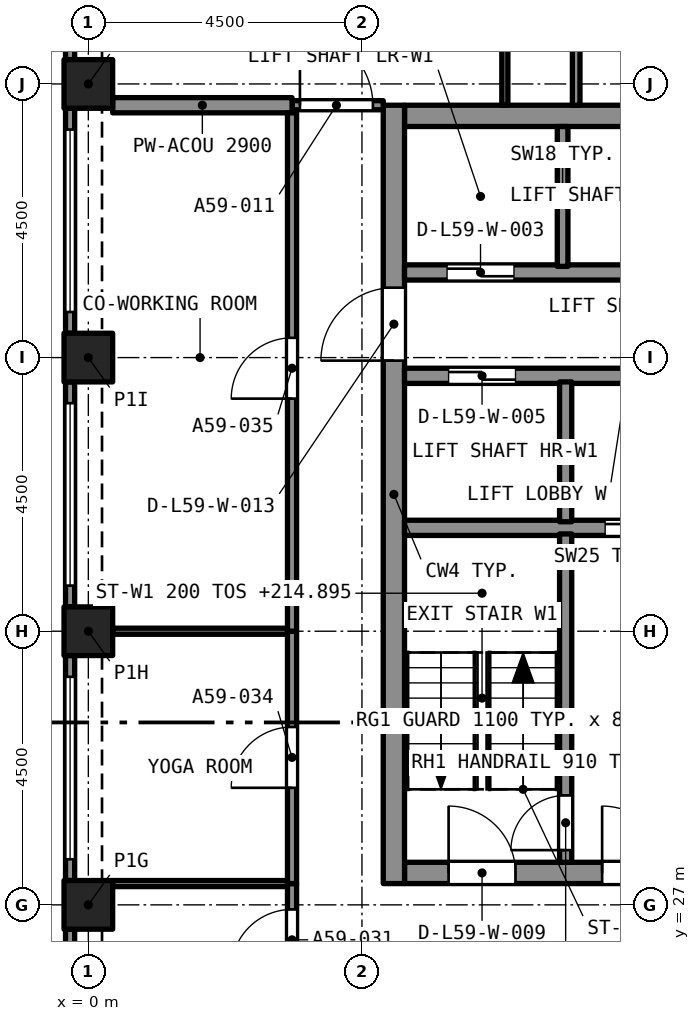
"""IFC4 building model, lengths in metres.
Left out: names, types, materials, properties, quantities, classifications, styles, units other than length and angle.
Written with IfcOpenShell. Run it as: python <this file> out.ifc"""

import sys

from ifc_helpers import new_model, si_unit, direction, frame, frame_2d, origin, origin_2d, place, context, subcontext, project, spatial, rectangle, extrude, element, fill, save


model = new_model("IFC4")
c1 = context("Model", 3, precision=1e-05, world=origin(), true_north=direction((0.0, 1.0)))
c2 = subcontext(c1, "Body", "Model", "MODEL_VIEW")
j1 = project(units=[si_unit("LENGTHUNIT", "METRE"), si_unit("PLANEANGLEUNIT", "RADIAN")], contexts=[c1])
p1 = place(None, origin())
s1 = spatial("IfcSite", under=j1, at=p1, CompositionType="ELEMENT")
p2 = place(p1, origin())
s2 = spatial("IfcBuilding", under=s1, at=p2, CompositionType="ELEMENT")
p3 = place(p2, frame((0.0, 0.0, 213.295)))
s3 = spatial("IfcBuildingStorey", under=s2, at=p3, CompositionType="ELEMENT", Elevation=213.295)
for number, where, z_axis, x_axis in (
    (1, (0.0, 27.0, 0.0), (0.0, 0.0, 1.0), (1.0, 0.0, 0.0)),
    (2, (0.0, 31.5, 0.0), (0.0, 0.0, 1.0), (1.0, 0.0, 0.0)),
    (3, (0.0, 36.0, 0.0), (0.0, 0.0, 1.0), (1.0, 0.0, 0.0)),
    (4, (0.0, 40.5, 0.0), (0.0, 0.0, 1.0), (1.0, 0.0, 0.0)),
):
    element("IfcColumn", number, at=place(p3, frame(where, z_axis=z_axis, x_axis=x_axis)), inside=s3, PredefinedType="COLUMN", context=c2, shape_type="SweptSolid", body=[
        extrude(rectangle(XDim=0.8, YDim=0.8, at=origin_2d()), origin(), (0.0, 0.0, 1.0), 3.2),
    ])
p4 = place(p3, frame((5.2, 27.525, 0.0), z_axis=(0.0, 0.0, 1.0), x_axis=(1.0, 0.0, 0.0)))
e5 = element("IfcWall", 5, at=p4, inside=s3, PredefinedType="SOLIDWALL", context=c2, shape_type="SweptSolid", body=[
    extrude(rectangle(XDim=7.6, YDim=0.35, at=frame_2d((3.8, 0.0))), origin(), (0.0, 0.0, 1.0), 3.2),
])
p5 = place(p4, frame((0.725, 0.0, 0.0)))
e6 = element("IfcOpeningElement", 6, at=p5, cuts=e5, PredefinedType="OPENING", context=c2, shape_type="SweptSolid", body=[
    extrude(rectangle(XDim=1.1, YDim=2.1, at=frame_2d((0.55, 1.05))), frame((0.0, 0.185, 0.0), z_axis=(0.0, -1.0, 0.0), x_axis=(1.0, 0.0, 0.0)), (0.0, 0.0, 1.0), 0.37),
])
p6 = place(p4, frame((3.25, 0.0, 0.0)))
e7 = element("IfcOpeningElement", 7, at=p6, cuts=e5, PredefinedType="OPENING", context=c2, shape_type="SweptSolid", body=[
    extrude(rectangle(XDim=1.1, YDim=2.1, at=frame_2d((0.55, 1.05))), frame((0.0, 0.185, 0.0), z_axis=(0.0, -1.0, 0.0), x_axis=(1.0, 0.0, 0.0)), (0.0, 0.0, 1.0), 0.37),
])
p7 = place(p4, frame((5.775, 0.0, 0.0)))
e8 = element("IfcOpeningElement", 8, at=p7, cuts=e5, PredefinedType="OPENING", context=c2, shape_type="SweptSolid", body=[
    extrude(rectangle(XDim=1.1, YDim=2.1, at=frame_2d((0.55, 1.05))), frame((0.0, 0.185, 0.0), z_axis=(0.0, -1.0, 0.0), x_axis=(1.0, 0.0, 0.0)), (0.0, 0.0, 1.0), 0.37),
])
p8 = place(p3, frame((5.2, 39.975, 0.0), z_axis=(0.0, 0.0, 1.0), x_axis=(1.0, 0.0, 0.0)))
e9 = element("IfcWall", 9, at=p8, inside=s3, PredefinedType="SOLIDWALL", context=c2, shape_type="SweptSolid", body=[
    extrude(rectangle(XDim=7.6, YDim=0.35, at=frame_2d((3.8, 0.0))), origin(), (0.0, 0.0, 1.0), 3.2),
])
p9 = place(p3, frame((5.025, 27.35, 0.0), z_axis=(0.0, 0.0, 1.0), x_axis=(0.0, 1.0, 0.0)))
e10 = element("IfcWall", 10, at=p9, inside=s3, PredefinedType="SOLIDWALL", context=c2, shape_type="SweptSolid", body=[
    extrude(rectangle(XDim=12.8, YDim=0.35, at=frame_2d((6.4, 0.0))), origin(), (0.0, 0.0, 1.0), 3.2),
])
p10 = place(p9, frame((8.6, 0.0, 0.0)))
e11 = element("IfcOpeningElement", 11, at=p10, cuts=e10, PredefinedType="OPENING", context=c2, shape_type="SweptSolid", body=[
    extrude(rectangle(XDim=1.2, YDim=2.1, at=frame_2d((0.6, 1.05))), frame((0.0, 0.185, 0.0), z_axis=(0.0, -1.0, 0.0), x_axis=(1.0, 0.0, 0.0)), (0.0, 0.0, 1.0), 0.37),
])
p11 = place(p3, frame((-0.3, 40.9, 0.0), z_axis=(0.0, 0.0, 1.0), x_axis=(0.0, 1.0, 0.0)))
e12 = element("IfcWall", 12, at=p11, inside=s3, PredefinedType="SOLIDWALL", context=c2, shape_type="SweptSolid", body=[
    extrude(rectangle(XDim=3.7, YDim=0.15, at=frame_2d((1.85, 0.0))), origin(), (0.0, 0.0, 1.0), 3.2),
])
p12 = place(p11, frame((0.35, 0.0, 0.45)))
e13 = element("IfcOpeningElement", 13, at=p12, cuts=e12, PredefinedType="OPENING", context=c2, shape_type="SweptSolid", body=[
    extrude(rectangle(XDim=3.0, YDim=1.95, at=frame_2d((1.5, 0.975))), frame((0.0, 0.085, 0.0), z_axis=(0.0, -1.0, 0.0), x_axis=(1.0, 0.0, 0.0)), (0.0, 0.0, 1.0), 0.17),
])
p13 = place(p3, frame((-0.3, 36.4, 0.0), z_axis=(0.0, 0.0, 1.0), x_axis=(0.0, 1.0, 0.0)))
e14 = element("IfcWall", 14, at=p13, inside=s3, PredefinedType="SOLIDWALL", context=c2, shape_type="SweptSolid", body=[
    extrude(rectangle(XDim=3.7, YDim=0.15, at=frame_2d((1.85, 0.0))), origin(), (0.0, 0.0, 1.0), 3.2),
])
p14 = place(p13, frame((0.35, 0.0, 0.45)))
e15 = element("IfcOpeningElement", 15, at=p14, cuts=e14, PredefinedType="OPENING", context=c2, shape_type="SweptSolid", body=[
    extrude(rectangle(XDim=3.0, YDim=1.95, at=frame_2d((1.5, 0.975))), frame((0.0, 0.085, 0.0), z_axis=(0.0, -1.0, 0.0), x_axis=(1.0, 0.0, 0.0)), (0.0, 0.0, 1.0), 0.17),
])
p15 = place(p3, frame((-0.3, 31.9, 0.0), z_axis=(0.0, 0.0, 1.0), x_axis=(0.0, 1.0, 0.0)))
e16 = element("IfcWall", 16, at=p15, inside=s3, PredefinedType="SOLIDWALL", context=c2, shape_type="SweptSolid", body=[
    extrude(rectangle(XDim=3.7, YDim=0.15, at=frame_2d((1.85, 0.0))), origin(), (0.0, 0.0, 1.0), 3.2),
])
p16 = place(p15, frame((0.35, 0.0, 0.45)))
e17 = element("IfcOpeningElement", 17, at=p16, cuts=e16, PredefinedType="OPENING", context=c2, shape_type="SweptSolid", body=[
    extrude(rectangle(XDim=3.0, YDim=1.95, at=frame_2d((1.5, 0.975))), frame((0.0, 0.085, 0.0), z_axis=(0.0, -1.0, 0.0), x_axis=(1.0, 0.0, 0.0)), (0.0, 0.0, 1.0), 0.17),
])
p17 = place(p3, frame((-0.3, 27.4, 0.0), z_axis=(0.0, 0.0, 1.0), x_axis=(0.0, 1.0, 0.0)))
e18 = element("IfcWall", 18, at=p17, inside=s3, PredefinedType="SOLIDWALL", context=c2, shape_type="SweptSolid", body=[
    extrude(rectangle(XDim=3.7, YDim=0.15, at=frame_2d((1.85, 0.0))), origin(), (0.0, 0.0, 1.0), 3.2),
])
p18 = place(p17, frame((0.35, 0.0, 0.45)))
e19 = element("IfcOpeningElement", 19, at=p18, cuts=e18, PredefinedType="OPENING", context=c2, shape_type="SweptSolid", body=[
    extrude(rectangle(XDim=3.0, YDim=1.95, at=frame_2d((1.5, 0.975))), frame((0.0, 0.085, 0.0), z_axis=(0.0, -1.0, 0.0), x_axis=(1.0, 0.0, 0.0)), (0.0, 0.0, 1.0), 0.17),
])
p19 = place(p3, frame((-0.3, 22.9, 0.0), z_axis=(0.0, 0.0, 1.0), x_axis=(0.0, 1.0, 0.0)))
e20 = element("IfcWall", 20, at=p19, inside=s3, PredefinedType="SOLIDWALL", context=c2, shape_type="SweptSolid", body=[
    extrude(rectangle(XDim=3.7, YDim=0.15, at=frame_2d((1.85, 0.0))), origin(), (0.0, 0.0, 1.0), 3.2),
])
p20 = place(p19, frame((0.35, 0.0, 0.45)))
e21 = element("IfcOpeningElement", 21, at=p20, cuts=e20, PredefinedType="OPENING", context=c2, shape_type="SweptSolid", body=[
    extrude(rectangle(XDim=3.0, YDim=1.95, at=frame_2d((1.5, 0.975))), frame((0.0, 0.085, 0.0), z_axis=(0.0, -1.0, 0.0), x_axis=(1.0, 0.0, 0.0)), (0.0, 0.0, 1.0), 0.17),
])
p21 = place(p3, frame((8.023, 40.15, 0.0), z_axis=(0.0, 0.0, 1.0), x_axis=(0.0, 1.0, 0.0)))
e22 = element("IfcWall", 22, at=p21, inside=s3, PredefinedType="PARTITIONING", context=c2, shape_type="SweptSolid", body=[
    extrude(rectangle(XDim=3.408, YDim=0.125, at=frame_2d((1.704, 0.0))), origin(), (0.0, 0.0, 1.0), 2.9),
])
p22 = place(p3, frame((6.85, 40.15, 0.0), z_axis=(0.0, 0.0, 1.0), x_axis=(0.0, 1.0, 0.0)))
e23 = element("IfcWall", 23, at=p22, inside=s3, PredefinedType="PARTITIONING", context=c2, shape_type="SweptSolid", body=[
    extrude(rectangle(XDim=3.42, YDim=0.1, at=frame_2d((1.71, 0.0))), origin(), (0.0, 0.0, 1.0), 2.9),
])
p23 = place(p3, frame((3.35, 40.15, 0.0), z_axis=(0.0, 0.0, 1.0), x_axis=(1.0, 0.0, 0.0)))
e24 = element("IfcWall", 24, at=p23, inside=s3, PredefinedType="PARTITIONING", context=c2, shape_type="SweptSolid", body=[
    extrude(rectangle(XDim=1.5, YDim=0.15, at=frame_2d((0.75, 0.0))), origin(), (0.0, 0.0, 1.0), 2.9),
])
p24 = place(p23, frame((0.13, 0.0, 0.0)))
e25 = element("IfcOpeningElement", 25, at=p24, cuts=e24, PredefinedType="OPENING", context=c2, shape_type="SweptSolid", body=[
    extrude(rectangle(XDim=1.2, YDim=2.4, at=frame_2d((0.6, 1.2))), frame((0.0, 0.085, 0.0), z_axis=(0.0, -1.0, 0.0), x_axis=(1.0, 0.0, 0.0)), (0.0, 0.0, 1.0), 0.17),
])
p25 = place(p3, frame((0.4, 40.15, 0.0), z_axis=(0.0, 0.0, 1.0), x_axis=(1.0, 0.0, 0.0)))
e26 = element("IfcWall", 26, at=p25, inside=s3, PredefinedType="PARTITIONING", context=c2, shape_type="SweptSolid", body=[
    extrude(rectangle(XDim=2.95, YDim=0.25, at=frame_2d((1.475, 0.0))), origin(), (0.0, 0.0, 1.0), 2.9),
])
p26 = place(p3, frame((3.35, 25.425, 0.0), z_axis=(0.0, 0.0, 1.0), x_axis=(0.0, 1.0, 0.0)))
e27 = element("IfcWall", 27, at=p26, inside=s3, PredefinedType="PARTITIONING", context=c2, shape_type="SweptSolid", body=[
    extrude(rectangle(XDim=1.925, YDim=0.15, at=frame_2d((0.962, 0.0))), origin(), (0.0, 0.0, 1.0), 2.9),
])
p27 = place(p26, frame((0.5, 0.0, 0.0)))
e28 = element("IfcOpeningElement", 28, at=p27, cuts=e27, PredefinedType="OPENING", context=c2, shape_type="SweptSolid", body=[
    extrude(rectangle(XDim=1.0, YDim=2.1, at=frame_2d((0.5, 1.05))), frame((0.0, 0.085, 0.0), z_axis=(0.0, -1.0, 0.0), x_axis=(1.0, 0.0, 0.0)), (0.0, 0.0, 1.0), 0.17),
])
p28 = place(p3, frame((3.35, 27.35, 0.0), z_axis=(0.0, 0.0, 1.0), x_axis=(0.0, 1.0, 0.0)))
e29 = element("IfcWall", 29, at=p28, inside=s3, PredefinedType="PARTITIONING", context=c2, shape_type="SweptSolid", body=[
    extrude(rectangle(XDim=4.15, YDim=0.15, at=frame_2d((2.075, 0.0))), origin(), (0.0, 0.0, 1.0), 2.9),
])
p29 = place(p28, frame((1.575, 0.0, 0.0)))
e30 = element("IfcOpeningElement", 30, at=p29, cuts=e29, PredefinedType="OPENING", context=c2, shape_type="SweptSolid", body=[
    extrude(rectangle(XDim=1.0, YDim=2.1, at=frame_2d((0.5, 1.05))), frame((0.0, 0.085, 0.0), z_axis=(0.0, -1.0, 0.0), x_axis=(1.0, 0.0, 0.0)), (0.0, 0.0, 1.0), 0.17),
])
p30 = place(p3, frame((3.35, 31.5, 0.0), z_axis=(0.0, 0.0, 1.0), x_axis=(0.0, 1.0, 0.0)))
e31 = element("IfcWall", 31, at=p30, inside=s3, PredefinedType="PARTITIONING", context=c2, shape_type="SweptSolid", body=[
    extrude(rectangle(XDim=8.525, YDim=0.15, at=frame_2d((4.262, 0.0))), origin(), (0.0, 0.0, 1.0), 2.9),
])
p31 = place(p30, frame((3.825, 0.0, 0.0)))
e32 = element("IfcOpeningElement", 32, at=p31, cuts=e31, PredefinedType="OPENING", context=c2, shape_type="SweptSolid", body=[
    extrude(rectangle(XDim=1.0, YDim=2.1, at=frame_2d((0.5, 1.05))), frame((0.0, 0.085, 0.0), z_axis=(0.0, -1.0, 0.0), x_axis=(1.0, 0.0, 0.0)), (0.0, 0.0, 1.0), 0.17),
])
for number, where, z_axis, x_axis in (
    (33, (0.4, 27.35, 0.0), (0.0, 0.0, 1.0), (1.0, 0.0, 0.0)),
    (34, (0.4, 31.5, 0.0), (0.0, 0.0, 1.0), (1.0, 0.0, 0.0)),
):
    element("IfcWall", number, at=place(p3, frame(where, z_axis=z_axis, x_axis=x_axis)), inside=s3, PredefinedType="PARTITIONING", context=c2, shape_type="SweptSolid", body=[
        extrude(rectangle(XDim=2.875, YDim=0.1, at=frame_2d((1.438, 0.0))), origin(), (0.0, 0.0, 1.0), 2.9),
    ])
p32 = place(p3, frame((5.2, 33.2, 0.0), z_axis=(0.0, 0.0, 1.0), x_axis=(1.0, 0.0, 0.0)))
e35 = element("IfcWall", 35, at=p32, inside=s3, PredefinedType="SOLIDWALL", context=c2, shape_type="SweptSolid", body=[
    extrude(rectangle(XDim=7.6, YDim=0.25, at=frame_2d((3.8, 0.0))), origin(), (0.0, 0.0, 1.0), 2.9),
])
p33 = place(p32, frame((3.3, 0.0, 0.0)))
e36 = element("IfcOpeningElement", 36, at=p33, cuts=e35, PredefinedType="OPENING", context=c2, shape_type="SweptSolid", body=[
    extrude(rectangle(XDim=1.0, YDim=2.1, at=frame_2d((0.5, 1.05))), frame((0.0, 0.135, 0.0), z_axis=(0.0, -1.0, 0.0), x_axis=(1.0, 0.0, 0.0)), (0.0, 0.0, 1.0), 0.27),
])
p34 = place(p3, frame((5.2, 35.7, 0.0), z_axis=(0.0, 0.0, 1.0), x_axis=(1.0, 0.0, 0.0)))
e37 = element("IfcWall", 37, at=p34, inside=s3, PredefinedType="SOLIDWALL", context=c2, shape_type="SweptSolid", body=[
    extrude(rectangle(XDim=7.6, YDim=0.25, at=frame_2d((3.8, 0.0))), origin(), (0.0, 0.0, 1.0), 2.9),
])
p35 = place(p34, frame((0.725, 0.0, 0.0)))
e38 = element("IfcOpeningElement", 38, at=p35, cuts=e37, PredefinedType="OPENING", context=c2, shape_type="SweptSolid", body=[
    extrude(rectangle(XDim=1.1, YDim=2.4, at=frame_2d((0.55, 1.2))), frame((0.0, 0.135, 0.0), z_axis=(0.0, -1.0, 0.0), x_axis=(1.0, 0.0, 0.0)), (0.0, 0.0, 1.0), 0.27),
])
p36 = place(p34, frame((5.125, 0.0, 0.0)))
e39 = element("IfcOpeningElement", 39, at=p36, cuts=e37, PredefinedType="OPENING", context=c2, shape_type="SweptSolid", body=[
    extrude(rectangle(XDim=0.8, YDim=2.1, at=frame_2d((0.4, 1.05))), frame((0.0, 0.135, 0.0), z_axis=(0.0, -1.0, 0.0), x_axis=(1.0, 0.0, 0.0)), (0.0, 0.0, 1.0), 0.27),
])
p37 = place(p34, frame((6.45, 0.0, 0.0)))
e40 = element("IfcOpeningElement", 40, at=p37, cuts=e37, PredefinedType="OPENING", context=c2, shape_type="SweptSolid", body=[
    extrude(rectangle(XDim=0.9, YDim=2.1, at=frame_2d((0.45, 1.05))), frame((0.0, 0.135, 0.0), z_axis=(0.0, -1.0, 0.0), x_axis=(1.0, 0.0, 0.0)), (0.0, 0.0, 1.0), 0.27),
])
p38 = place(p3, frame((5.2, 37.4, 0.0), z_axis=(0.0, 0.0, 1.0), x_axis=(1.0, 0.0, 0.0)))
e41 = element("IfcWall", 41, at=p38, inside=s3, PredefinedType="SOLIDWALL", context=c2, shape_type="SweptSolid", body=[
    extrude(rectangle(XDim=7.6, YDim=0.25, at=frame_2d((3.8, 0.0))), origin(), (0.0, 0.0, 1.0), 2.9),
])
p39 = place(p38, frame((0.7, 0.0, 0.0)))
e42 = element("IfcOpeningElement", 42, at=p39, cuts=e41, PredefinedType="OPENING", context=c2, shape_type="SweptSolid", body=[
    extrude(rectangle(XDim=1.1, YDim=2.4, at=frame_2d((0.55, 1.2))), frame((0.0, 0.135, 0.0), z_axis=(0.0, -1.0, 0.0), x_axis=(1.0, 0.0, 0.0)), (0.0, 0.0, 1.0), 0.27),
])
p40 = place(p3, frame((7.85, 27.7, 0.0), z_axis=(0.0, 0.0, 1.0), x_axis=(0.0, 1.0, 0.0)))
e43 = element("IfcWall", 43, at=p40, inside=s3, PredefinedType="SOLIDWALL", context=c2, shape_type="SweptSolid", body=[
    extrude(rectangle(XDim=5.4, YDim=0.2, at=frame_2d((2.7, 0.0))), origin(), (0.0, 0.0, 1.0), 2.9),
])
p41 = place(p40, frame((0.2, 0.0, 0.0)))
e44 = element("IfcOpeningElement", 44, at=p41, cuts=e43, PredefinedType="OPENING", context=c2, shape_type="SweptSolid", body=[
    extrude(rectangle(XDim=0.9, YDim=2.1, at=frame_2d((0.45, 1.05))), frame((0.0, 0.11, 0.0), z_axis=(0.0, -1.0, 0.0), x_axis=(1.0, 0.0, 0.0)), (0.0, 0.0, 1.0), 0.22),
])
p42 = place(p3, frame((7.85, 33.3, 0.0), z_axis=(0.0, 0.0, 1.0), x_axis=(0.0, 1.0, 0.0)))
e45 = element("IfcWall", 45, at=p42, inside=s3, PredefinedType="SOLIDWALL", context=c2, shape_type="SweptSolid", body=[
    extrude(rectangle(XDim=2.3, YDim=0.2, at=frame_2d((1.15, 0.0))), origin(), (0.0, 0.0, 1.0), 2.9),
])
p43 = place(p3, frame((7.8, 37.5, 0.0), z_axis=(0.0, 0.0, 1.0), x_axis=(0.0, 1.0, 0.0)))
e46 = element("IfcWall", 46, at=p43, inside=s3, PredefinedType="SOLIDWALL", context=c2, shape_type="SweptSolid", body=[
    extrude(rectangle(XDim=2.3, YDim=0.175, at=frame_2d((1.15, 0.0))), origin(), (0.0, 0.0, 1.0), 2.9),
])
p44 = place(p14, origin())
e47 = element("IfcWindow", 47, at=p44, inside=s3, PartitioningType="SINGLE_PANEL", PredefinedType="WINDOW", context=c2, shape_type="SweptSolid", body=[
    extrude(rectangle(XDim=3.0, YDim=1.95, at=frame_2d((1.5, 0.975))), frame((0.0, 0.03, 0.0), z_axis=(0.0, -1.0, 0.0), x_axis=(1.0, 0.0, 0.0)), (0.0, 0.0, 1.0), 0.06),
])
fill(e15, e47)
p45 = place(p16, origin())
e48 = element("IfcWindow", 48, at=p45, inside=s3, PartitioningType="SINGLE_PANEL", PredefinedType="WINDOW", context=c2, shape_type="SweptSolid", body=[
    extrude(rectangle(XDim=3.0, YDim=1.95, at=frame_2d((1.5, 0.975))), frame((0.0, 0.03, 0.0), z_axis=(0.0, -1.0, 0.0), x_axis=(1.0, 0.0, 0.0)), (0.0, 0.0, 1.0), 0.06),
])
fill(e17, e48)
p46 = place(p18, origin())
e49 = element("IfcWindow", 49, at=p46, inside=s3, PartitioningType="SINGLE_PANEL", PredefinedType="WINDOW", context=c2, shape_type="SweptSolid", body=[
    extrude(rectangle(XDim=3.0, YDim=1.95, at=frame_2d((1.5, 0.975))), frame((0.0, 0.03, 0.0), z_axis=(0.0, -1.0, 0.0), x_axis=(1.0, 0.0, 0.0)), (0.0, 0.0, 1.0), 0.06),
])
fill(e19, e49)
p47 = place(p24, origin())
e50 = element("IfcDoor", 50, at=p47, inside=s3, OperationType="SINGLE_SWING_LEFT", PredefinedType="DOOR", context=c2, shape_type="SweptSolid", body=[
    extrude(rectangle(XDim=1.2, YDim=2.4, at=frame_2d((0.6, 1.2))), frame((0.0, 0.025, 0.0), z_axis=(0.0, -1.0, 0.0), x_axis=(1.0, 0.0, 0.0)), (0.0, 0.0, 1.0), 0.05),
])
fill(e25, e50)
p48 = place(p27, origin())
e51 = element("IfcDoor", 51, at=p48, inside=s3, OperationType="SINGLE_SWING_RIGHT", PredefinedType="DOOR", context=c2, shape_type="SweptSolid", body=[
    extrude(rectangle(XDim=1.0, YDim=2.1, at=frame_2d((0.5, 1.05))), frame((0.0, 0.025, 0.0), z_axis=(0.0, -1.0, 0.0), x_axis=(1.0, 0.0, 0.0)), (0.0, 0.0, 1.0), 0.05),
])
fill(e28, e51)
p49 = place(p29, origin())
e52 = element("IfcDoor", 52, at=p49, inside=s3, OperationType="SINGLE_SWING_RIGHT", PredefinedType="DOOR", context=c2, shape_type="SweptSolid", body=[
    extrude(rectangle(XDim=1.0, YDim=2.1, at=frame_2d((0.5, 1.05))), frame((0.0, 0.025, 0.0), z_axis=(0.0, -1.0, 0.0), x_axis=(1.0, 0.0, 0.0)), (0.0, 0.0, 1.0), 0.05),
])
fill(e30, e52)
p50 = place(p31, origin())
e53 = element("IfcDoor", 53, at=p50, inside=s3, OperationType="SINGLE_SWING_RIGHT", PredefinedType="DOOR", context=c2, shape_type="SweptSolid", body=[
    extrude(rectangle(XDim=1.0, YDim=2.1, at=frame_2d((0.5, 1.05))), frame((0.0, 0.025, 0.0), z_axis=(0.0, -1.0, 0.0), x_axis=(1.0, 0.0, 0.0)), (0.0, 0.0, 1.0), 0.05),
])
fill(e32, e53)
p51 = place(p41, origin())
e54 = element("IfcDoor", 54, at=p51, inside=s3, OperationType="SINGLE_SWING_LEFT", PredefinedType="DOOR", context=c2, shape_type="SweptSolid", body=[
    extrude(rectangle(XDim=0.9, YDim=2.1, at=frame_2d((0.45, 1.05))), frame((0.0, 0.025, 0.0), z_axis=(0.0, -1.0, 0.0), x_axis=(1.0, 0.0, 0.0)), (0.0, 0.0, 1.0), 0.05),
])
fill(e44, e54)
p52 = place(p39, origin())
e55 = element("IfcDoor", 55, at=p52, inside=s3, OperationType="SLIDING_TO_LEFT", PredefinedType="DOOR", context=c2, shape_type="SweptSolid", body=[
    extrude(rectangle(XDim=1.1, YDim=2.4, at=frame_2d((0.55, 1.2))), frame((0.0, 0.025, 0.0), z_axis=(0.0, -1.0, 0.0), x_axis=(1.0, 0.0, 0.0)), (0.0, 0.0, 1.0), 0.05),
])
fill(e42, e55)
p53 = place(p35, origin())
e56 = element("IfcDoor", 56, at=p53, inside=s3, OperationType="SLIDING_TO_LEFT", PredefinedType="DOOR", context=c2, shape_type="SweptSolid", body=[
    extrude(rectangle(XDim=1.1, YDim=2.4, at=frame_2d((0.55, 1.2))), frame((0.0, 0.025, 0.0), z_axis=(0.0, -1.0, 0.0), x_axis=(1.0, 0.0, 0.0)), (0.0, 0.0, 1.0), 0.05),
])
fill(e38, e56)
p54 = place(p33, origin())
e57 = element("IfcDoor", 57, at=p54, inside=s3, OperationType="SLIDING_TO_LEFT", PredefinedType="DOOR", context=c2, shape_type="SweptSolid", body=[
    extrude(rectangle(XDim=1.0, YDim=2.1, at=frame_2d((0.5, 1.05))), frame((0.0, 0.025, 0.0), z_axis=(0.0, -1.0, 0.0), x_axis=(1.0, 0.0, 0.0)), (0.0, 0.0, 1.0), 0.05),
])
fill(e36, e57)
p55 = place(p5, origin())
e58 = element("IfcDoor", 58, at=p55, inside=s3, OperationType="SINGLE_SWING_LEFT", PredefinedType="DOOR", context=c2, shape_type="SweptSolid", body=[
    extrude(rectangle(XDim=1.1, YDim=2.1, at=frame_2d((0.55, 1.05))), frame((0.0, 0.025, 0.0), z_axis=(0.0, -1.0, 0.0), x_axis=(1.0, 0.0, 0.0)), (0.0, 0.0, 1.0), 0.05),
])
fill(e6, e58)
p56 = place(p6, origin())
e59 = element("IfcDoor", 59, at=p56, inside=s3, OperationType="SINGLE_SWING_LEFT", PredefinedType="DOOR", context=c2, shape_type="SweptSolid", body=[
    extrude(rectangle(XDim=1.1, YDim=2.1, at=frame_2d((0.55, 1.05))), frame((0.0, 0.025, 0.0), z_axis=(0.0, -1.0, 0.0), x_axis=(1.0, 0.0, 0.0)), (0.0, 0.0, 1.0), 0.05),
])
fill(e7, e59)
p57 = place(p10, origin())
e60 = element("IfcDoor", 60, at=p57, inside=s3, OperationType="SINGLE_SWING_LEFT", PredefinedType="DOOR", context=c2, shape_type="SweptSolid", body=[
    extrude(rectangle(XDim=1.2, YDim=2.1, at=frame_2d((0.6, 1.05))), frame((0.0, 0.025, 0.0), z_axis=(0.0, -1.0, 0.0), x_axis=(1.0, 0.0, 0.0)), (0.0, 0.0, 1.0), 0.05),
])
fill(e11, e60)
save(model, sys.argv[1])
